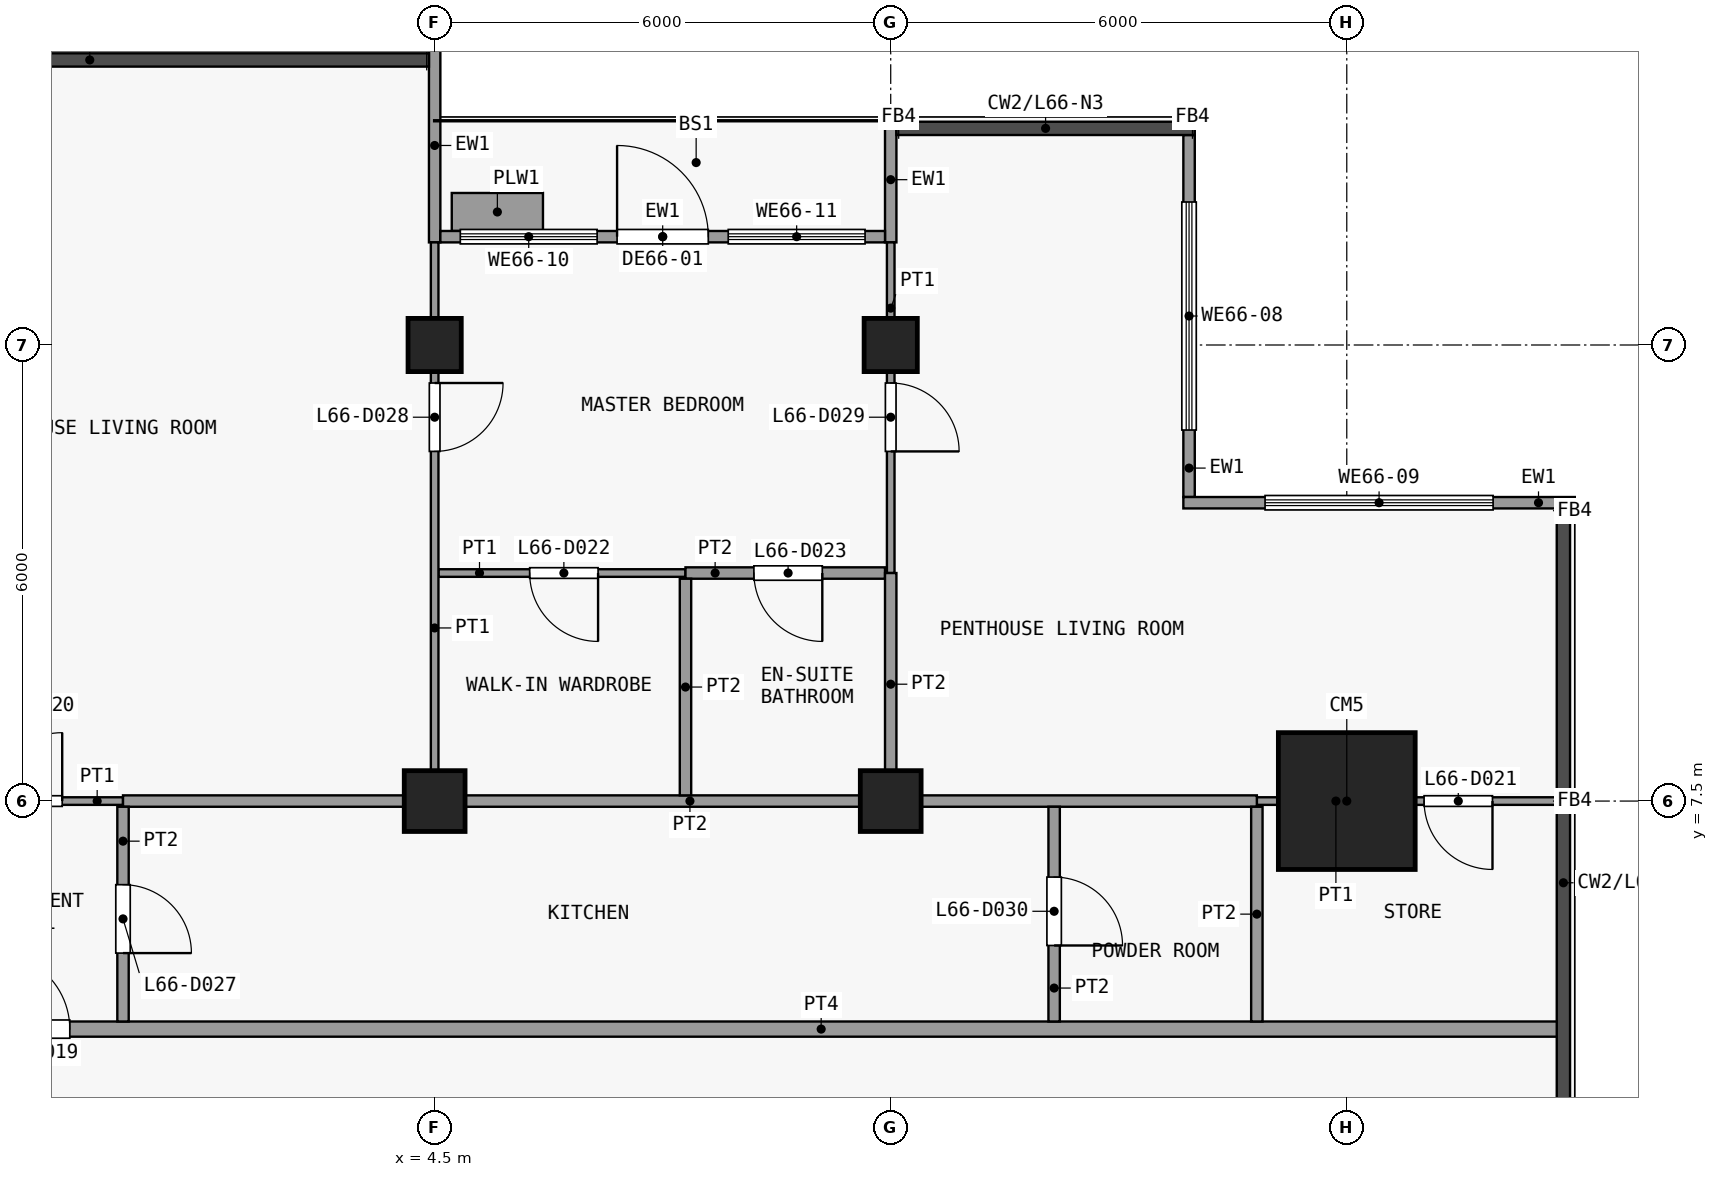
"""IFC4 building model, lengths in metres.
Left out: names, types, materials, properties, quantities, classifications, styles, units other than length and angle.
Written with IfcOpenShell. Run it as: python <this file> out.ifc"""

import sys

from ifc_helpers import new_model, si_unit, direction, frame, frame_2d, origin, origin_2d, place, context, subcontext, project, spatial, rectangle, extrude, element, fill, save


model = new_model("IFC4")
c1 = context("Model", 3, precision=1e-05, world=origin(), true_north=direction((0.0, 1.0)))
c2 = subcontext(c1, "Body", "Model", "MODEL_VIEW")
j1 = project(units=[si_unit("LENGTHUNIT", "METRE"), si_unit("PLANEANGLEUNIT", "RADIAN")], contexts=[c1])
p1 = place(None, origin())
s1 = spatial("IfcSite", under=j1, at=p1, CompositionType="ELEMENT")
p2 = place(p1, origin())
s2 = spatial("IfcBuilding", under=s1, at=p2, CompositionType="ELEMENT")
p3 = place(p2, frame((0.0, 0.0, 262.7)))
s3 = spatial("IfcBuildingStorey", under=s2, at=p3, CompositionType="ELEMENT", Elevation=262.7)
p4 = place(p3, frame((4.5, 7.5, 0.0), z_axis=(0.0, 0.0, 1.0), x_axis=(1.0, 0.0, 0.0)))
e1 = element("IfcColumn", 1, at=p4, inside=s3, PredefinedType="COLUMN", context=c2, shape_type="SweptSolid", body=[
    extrude(rectangle(XDim=0.8, YDim=0.8, at=origin_2d()), origin(), (0.0, 0.0, 1.0), 3.6),
])
p5 = place(p3, frame((4.5, 13.5, 0.0), z_axis=(0.0, 0.0, 1.0), x_axis=(1.0, 0.0, 0.0)))
e2 = element("IfcColumn", 2, at=p5, inside=s3, PredefinedType="COLUMN", context=c2, shape_type="SweptSolid", body=[
    extrude(rectangle(XDim=0.7, YDim=0.7, at=origin_2d()), origin(), (0.0, 0.0, 1.0), 3.6),
])
p6 = place(p3, frame((10.5, 7.5, 0.0), z_axis=(0.0, 0.0, 1.0), x_axis=(1.0, 0.0, 0.0)))
e3 = element("IfcColumn", 3, at=p6, inside=s3, PredefinedType="COLUMN", context=c2, shape_type="SweptSolid", body=[
    extrude(rectangle(XDim=0.8, YDim=0.8, at=origin_2d()), origin(), (0.0, 0.0, 1.0), 3.6),
])
p7 = place(p3, frame((10.5, 13.5, 0.0), z_axis=(0.0, 0.0, 1.0), x_axis=(1.0, 0.0, 0.0)))
e4 = element("IfcColumn", 4, at=p7, inside=s3, PredefinedType="COLUMN", context=c2, shape_type="SweptSolid", body=[
    extrude(rectangle(XDim=0.7, YDim=0.7, at=origin_2d()), origin(), (0.0, 0.0, 1.0), 3.6),
])
p8 = place(p3, frame((16.5, 7.5, 0.0), z_axis=(0.0, 0.0, 1.0), x_axis=(1.0, 0.0, 0.0)))
e5 = element("IfcColumn", 5, at=p8, inside=s3, PredefinedType="COLUMN", context=c2, shape_type="SweptSolid", body=[
    extrude(rectangle(XDim=1.8, YDim=1.8, at=origin_2d()), origin(), (0.0, 0.0, 1.0), 3.6),
])
p9 = place(p3, frame((14.425, 16.262, 0.0), z_axis=(0.0, 0.0, 1.0), x_axis=(0.0, -1.0, 0.0)))
e6 = element("IfcWall", 6, at=p9, inside=s3, PredefinedType="SOLIDWALL", context=c2, shape_type="SweptSolid", body=[
    extrude(rectangle(XDim=4.762, YDim=0.15, at=frame_2d((2.381, 0.0))), origin(), (0.0, 0.0, 1.0), 3.3),
])
p10 = place(p9, frame((0.881, 0.0, 0.9)))
e7 = element("IfcOpeningElement", 7, at=p10, cuts=e6, PredefinedType="OPENING", context=c2, shape_type="SweptSolid", body=[
    extrude(rectangle(XDim=3.0, YDim=2.4, at=frame_2d((1.5, 1.2))), frame((0.0, 0.085, 0.0), z_axis=(0.0, -1.0, 0.0), x_axis=(1.0, 0.0, 0.0)), (0.0, 0.0, 1.0), 0.17),
])
p11 = place(p3, frame((14.35, 11.425, 0.0), z_axis=(0.0, 0.0, 1.0), x_axis=(1.0, 0.0, 0.0)))
e8 = element("IfcWall", 8, at=p11, inside=s3, PredefinedType="SOLIDWALL", context=c2, shape_type="SweptSolid", body=[
    extrude(rectangle(XDim=5.15, YDim=0.15, at=frame_2d((2.575, 0.0))), origin(), (0.0, 0.0, 1.0), 3.3),
])
p12 = place(p11, frame((1.075, 0.0, 0.9)))
e9 = element("IfcOpeningElement", 9, at=p12, cuts=e8, PredefinedType="OPENING", context=c2, shape_type="SweptSolid", body=[
    extrude(rectangle(XDim=3.0, YDim=2.4, at=frame_2d((1.5, 1.2))), frame((0.0, 0.085, 0.0), z_axis=(0.0, -1.0, 0.0), x_axis=(1.0, 0.0, 0.0)), (0.0, 0.0, 1.0), 0.17),
])
p13 = place(p3, frame((4.5, 14.85, 0.0), z_axis=(0.0, 0.0, 1.0), x_axis=(0.0, 1.0, 0.0)))
e10 = element("IfcWall", 10, at=p13, inside=s3, PredefinedType="SOLIDWALL", context=c2, shape_type="SweptSolid", body=[
    extrude(rectangle(XDim=2.55, YDim=0.15, at=frame_2d((1.275, 0.0))), origin(), (0.0, 0.0, 1.0), 3.3),
])
p14 = place(p3, frame((10.5, 14.85, 0.0), z_axis=(0.0, 0.0, 1.0), x_axis=(0.0, 1.0, 0.0)))
e11 = element("IfcWall", 11, at=p14, inside=s3, PredefinedType="SOLIDWALL", context=c2, shape_type="SweptSolid", body=[
    extrude(rectangle(XDim=1.65, YDim=0.15, at=frame_2d((0.825, 0.0))), origin(), (0.0, 0.0, 1.0), 3.3),
])
p15 = place(p3, frame((4.575, 14.925, 0.0), z_axis=(0.0, 0.0, 1.0), x_axis=(1.0, 0.0, 0.0)))
e12 = element("IfcWall", 12, at=p15, inside=s3, PredefinedType="SOLIDWALL", context=c2, shape_type="SweptSolid", body=[
    extrude(rectangle(XDim=5.85, YDim=0.15, at=frame_2d((2.925, 0.0))), origin(), (0.0, 0.0, 1.0), 3.3),
])
p16 = place(p15, frame((2.325, 0.0, 0.0)))
e13 = element("IfcOpeningElement", 13, at=p16, cuts=e12, PredefinedType="OPENING", context=c2, shape_type="SweptSolid", body=[
    extrude(rectangle(XDim=1.2, YDim=2.4, at=frame_2d((0.6, 1.2))), frame((0.0, 0.085, 0.0), z_axis=(0.0, -1.0, 0.0), x_axis=(1.0, 0.0, 0.0)), (0.0, 0.0, 1.0), 0.17),
])
p17 = place(p15, frame((0.262, 0.0, 0.9)))
e14 = element("IfcOpeningElement", 14, at=p17, cuts=e12, PredefinedType="OPENING", context=c2, shape_type="SweptSolid", body=[
    extrude(rectangle(XDim=1.8, YDim=2.1, at=frame_2d((0.9, 1.05))), frame((0.0, 0.085, 0.0), z_axis=(0.0, -1.0, 0.0), x_axis=(1.0, 0.0, 0.0)), (0.0, 0.0, 1.0), 0.17),
])
p18 = place(p15, frame((3.788, 0.0, 0.9)))
e15 = element("IfcOpeningElement", 15, at=p18, cuts=e12, PredefinedType="OPENING", context=c2, shape_type="SweptSolid", body=[
    extrude(rectangle(XDim=1.8, YDim=2.1, at=frame_2d((0.9, 1.05))), frame((0.0, 0.085, 0.0), z_axis=(0.0, -1.0, 0.0), x_axis=(1.0, 0.0, 0.0)), (0.0, 0.0, 1.0), 0.17),
])
p19 = place(p3, frame((4.725, 15.25, 0.0), z_axis=(0.0, 0.0, 1.0), x_axis=(1.0, 0.0, 0.0)))
e16 = element("IfcWall", 16, at=p19, inside=s3, PredefinedType="USERDEFINED", context=c2, shape_type="SweptSolid", body=[
    extrude(rectangle(XDim=1.2, YDim=0.5, at=frame_2d((0.6, 0.0))), origin(), (0.0, 0.0, 1.0), 0.9),
])
p20 = place(p3, frame((-19.35, 4.5, 0.0), z_axis=(0.0, 0.0, 1.0), x_axis=(1.0, 0.0, 0.0)))
e17 = element("IfcWall", 17, at=p20, inside=s3, PredefinedType="PARTITIONING", context=c2, shape_type="SweptSolid", body=[
    extrude(rectangle(XDim=38.7, YDim=0.2, at=frame_2d((19.35, 0.0))), origin(), (0.0, 0.0, 1.0), 3.3),
])
p21 = place(p20, frame((1.0, 0.0, 0.0)))
e18 = element("IfcOpeningElement", 18, at=p21, cuts=e17, PredefinedType="OPENING", context=c2, shape_type="SweptSolid", body=[
    extrude(rectangle(XDim=0.9, YDim=2.1, at=frame_2d((0.45, 1.05))), frame((0.0, 0.11, 0.0), z_axis=(0.0, -1.0, 0.0), x_axis=(1.0, 0.0, 0.0)), (0.0, 0.0, 1.0), 0.22),
])
p22 = place(p20, frame((5.35, 0.0, 0.0)))
e19 = element("IfcOpeningElement", 19, at=p22, cuts=e17, PredefinedType="OPENING", context=c2, shape_type="SweptSolid", body=[
    extrude(rectangle(XDim=0.9, YDim=2.1, at=frame_2d((0.45, 1.05))), frame((0.0, 0.11, 0.0), z_axis=(0.0, -1.0, 0.0), x_axis=(1.0, 0.0, 0.0)), (0.0, 0.0, 1.0), 0.22),
])
p23 = place(p20, frame((11.35, 0.0, 0.0)))
e20 = element("IfcOpeningElement", 20, at=p23, cuts=e17, PredefinedType="OPENING", context=c2, shape_type="SweptSolid", body=[
    extrude(rectangle(XDim=0.9, YDim=2.1, at=frame_2d((0.45, 1.05))), frame((0.0, 0.11, 0.0), z_axis=(0.0, -1.0, 0.0), x_axis=(1.0, 0.0, 0.0)), (0.0, 0.0, 1.0), 0.22),
])
p24 = place(p20, frame((18.05, 0.0, 0.0)))
e21 = element("IfcOpeningElement", 21, at=p24, cuts=e17, PredefinedType="OPENING", context=c2, shape_type="SweptSolid", body=[
    extrude(rectangle(XDim=1.0, YDim=2.1, at=frame_2d((0.5, 1.05))), frame((0.0, 0.11, 0.0), z_axis=(0.0, -1.0, 0.0), x_axis=(1.0, 0.0, 0.0)), (0.0, 0.0, 1.0), 0.22),
])
p25 = place(p3, frame((-2.0, 7.5, 0.0), z_axis=(0.0, 0.0, 1.0), x_axis=(1.0, 0.0, 0.0)))
e22 = element("IfcWall", 22, at=p25, inside=s3, PredefinedType="PARTITIONING", context=c2, shape_type="SweptSolid", body=[
    extrude(rectangle(XDim=2.4, YDim=0.1, at=frame_2d((1.2, 0.0))), origin(), (0.0, 0.0, 1.0), 3.3),
])
p26 = place(p25, frame((0.7, 0.0, 0.0)))
e23 = element("IfcOpeningElement", 23, at=p26, cuts=e22, PredefinedType="OPENING", context=c2, shape_type="SweptSolid", body=[
    extrude(rectangle(XDim=0.9, YDim=2.1, at=frame_2d((0.45, 1.05))), frame((0.0, 0.06, 0.0), z_axis=(0.0, -1.0, 0.0), x_axis=(1.0, 0.0, 0.0)), (0.0, 0.0, 1.0), 0.12),
])
p27 = place(p3, frame((15.317, 7.5, 0.0), z_axis=(0.0, 0.0, 1.0), x_axis=(1.0, 0.0, 0.0)))
e24 = element("IfcWall", 24, at=p27, inside=s3, PredefinedType="PARTITIONING", context=c2, shape_type="SweptSolid", body=[
    extrude(rectangle(XDim=3.946, YDim=0.1, at=frame_2d((1.973, 0.0))), origin(), (0.0, 0.0, 1.0), 3.3),
])
p28 = place(p27, frame((2.2, 0.0, 0.0)))
e25 = element("IfcOpeningElement", 25, at=p28, cuts=e24, PredefinedType="OPENING", context=c2, shape_type="SweptSolid", body=[
    extrude(rectangle(XDim=0.9, YDim=2.1, at=frame_2d((0.45, 1.05))), frame((0.0, 0.06, 0.0), z_axis=(0.0, -1.0, 0.0), x_axis=(1.0, 0.0, 0.0)), (0.0, 0.0, 1.0), 0.12),
])
p29 = place(p3, frame((0.4, 7.5, 0.0), z_axis=(0.0, 0.0, 1.0), x_axis=(1.0, 0.0, 0.0)))
e26 = element("IfcWall", 26, at=p29, inside=s3, PredefinedType="PARTITIONING", context=c2, shape_type="SweptSolid", body=[
    extrude(rectangle(XDim=14.917, YDim=0.15, at=frame_2d((7.458, 0.0))), origin(), (0.0, 0.0, 1.0), 3.3),
])
p30 = place(p3, frame((4.55, 10.5, 0.0), z_axis=(0.0, 0.0, 1.0), x_axis=(1.0, 0.0, 0.0)))
e27 = element("IfcWall", 27, at=p30, inside=s3, PredefinedType="PARTITIONING", context=c2, shape_type="SweptSolid", body=[
    extrude(rectangle(XDim=3.25, YDim=0.1, at=frame_2d((1.625, 0.0))), origin(), (0.0, 0.0, 1.0), 3.3),
])
p31 = place(p30, frame((1.2, 0.0, 0.0)))
e28 = element("IfcOpeningElement", 28, at=p31, cuts=e27, PredefinedType="OPENING", context=c2, shape_type="SweptSolid", body=[
    extrude(rectangle(XDim=0.9, YDim=2.1, at=frame_2d((0.45, 1.05))), frame((0.0, 0.06, 0.0), z_axis=(0.0, -1.0, 0.0), x_axis=(1.0, 0.0, 0.0)), (0.0, 0.0, 1.0), 0.12),
])
p32 = place(p3, frame((7.8, 10.5, 0.0), z_axis=(0.0, 0.0, 1.0), x_axis=(1.0, 0.0, 0.0)))
e29 = element("IfcWall", 29, at=p32, inside=s3, PredefinedType="PARTITIONING", context=c2, shape_type="SweptSolid", body=[
    extrude(rectangle(XDim=2.625, YDim=0.15, at=frame_2d((1.312, 0.0))), origin(), (0.0, 0.0, 1.0), 3.3),
])
p33 = place(p32, frame((0.9, 0.0, 0.0)))
e30 = element("IfcOpeningElement", 30, at=p33, cuts=e29, PredefinedType="OPENING", context=c2, shape_type="SweptSolid", body=[
    extrude(rectangle(XDim=0.9, YDim=2.1, at=frame_2d((0.45, 1.05))), frame((0.0, 0.085, 0.0), z_axis=(0.0, -1.0, 0.0), x_axis=(1.0, 0.0, 0.0)), (0.0, 0.0, 1.0), 0.17),
])
p34 = place(p3, frame((0.4, 4.6, 0.0), z_axis=(0.0, 0.0, 1.0), x_axis=(0.0, 1.0, 0.0)))
e31 = element("IfcWall", 31, at=p34, inside=s3, PredefinedType="PARTITIONING", context=c2, shape_type="SweptSolid", body=[
    extrude(rectangle(XDim=2.825, YDim=0.15, at=frame_2d((1.413, 0.0))), origin(), (0.0, 0.0, 1.0), 3.3),
])
p35 = place(p34, frame((0.9, 0.0, 0.0)))
e32 = element("IfcOpeningElement", 32, at=p35, cuts=e31, PredefinedType="OPENING", context=c2, shape_type="SweptSolid", body=[
    extrude(rectangle(XDim=0.9, YDim=2.1, at=frame_2d((0.45, 1.05))), frame((0.0, 0.085, 0.0), z_axis=(0.0, -1.0, 0.0), x_axis=(1.0, 0.0, 0.0)), (0.0, 0.0, 1.0), 0.17),
])
p36 = place(p3, frame((4.5, 7.575, 0.0), z_axis=(0.0, 0.0, 1.0), x_axis=(0.0, 1.0, 0.0)))
e33 = element("IfcWall", 33, at=p36, inside=s3, PredefinedType="PARTITIONING", context=c2, shape_type="SweptSolid", body=[
    extrude(rectangle(XDim=7.275, YDim=0.1, at=frame_2d((3.638, 0.0))), origin(), (0.0, 0.0, 1.0), 3.3),
])
p37 = place(p36, frame((4.525, 0.0, 0.0)))
e34 = element("IfcOpeningElement", 34, at=p37, cuts=e33, PredefinedType="OPENING", context=c2, shape_type="SweptSolid", body=[
    extrude(rectangle(XDim=0.9, YDim=2.1, at=frame_2d((0.45, 1.05))), frame((0.0, 0.06, 0.0), z_axis=(0.0, -1.0, 0.0), x_axis=(1.0, 0.0, 0.0)), (0.0, 0.0, 1.0), 0.12),
])
p38 = place(p3, frame((7.8, 7.575, 0.0), z_axis=(0.0, 0.0, 1.0), x_axis=(0.0, 1.0, 0.0)))
e35 = element("IfcWall", 35, at=p38, inside=s3, PredefinedType="PARTITIONING", context=c2, shape_type="SweptSolid", body=[
    extrude(rectangle(XDim=2.85, YDim=0.15, at=frame_2d((1.425, 0.0))), origin(), (0.0, 0.0, 1.0), 3.3),
])
p39 = place(p3, frame((10.5, 10.5, 0.0), z_axis=(0.0, 0.0, 1.0), x_axis=(0.0, 1.0, 0.0)))
e36 = element("IfcWall", 36, at=p39, inside=s3, PredefinedType="PARTITIONING", context=c2, shape_type="SweptSolid", body=[
    extrude(rectangle(XDim=4.35, YDim=0.1, at=frame_2d((2.175, 0.0))), origin(), (0.0, 0.0, 1.0), 3.3),
])
p40 = place(p39, frame((1.6, 0.0, 0.0)))
e37 = element("IfcOpeningElement", 37, at=p40, cuts=e36, PredefinedType="OPENING", context=c2, shape_type="SweptSolid", body=[
    extrude(rectangle(XDim=0.9, YDim=2.1, at=frame_2d((0.45, 1.05))), frame((0.0, 0.06, 0.0), z_axis=(0.0, -1.0, 0.0), x_axis=(1.0, 0.0, 0.0)), (0.0, 0.0, 1.0), 0.12),
])
p41 = place(p3, frame((10.5, 7.575, 0.0), z_axis=(0.0, 0.0, 1.0), x_axis=(0.0, 1.0, 0.0)))
e38 = element("IfcWall", 38, at=p41, inside=s3, PredefinedType="PARTITIONING", context=c2, shape_type="SweptSolid", body=[
    extrude(rectangle(XDim=2.925, YDim=0.15, at=frame_2d((1.462, 0.0))), origin(), (0.0, 0.0, 1.0), 3.3),
])
p42 = place(p3, frame((12.65, 4.6, 0.0), z_axis=(0.0, 0.0, 1.0), x_axis=(0.0, 1.0, 0.0)))
e39 = element("IfcWall", 39, at=p42, inside=s3, PredefinedType="PARTITIONING", context=c2, shape_type="SweptSolid", body=[
    extrude(rectangle(XDim=2.825, YDim=0.15, at=frame_2d((1.413, 0.0))), origin(), (0.0, 0.0, 1.0), 3.3),
])
p43 = place(p42, frame((1.0, 0.0, 0.0)))
e40 = element("IfcOpeningElement", 40, at=p43, cuts=e39, PredefinedType="OPENING", context=c2, shape_type="SweptSolid", body=[
    extrude(rectangle(XDim=0.9, YDim=2.1, at=frame_2d((0.45, 1.05))), frame((0.0, 0.085, 0.0), z_axis=(0.0, -1.0, 0.0), x_axis=(1.0, 0.0, 0.0)), (0.0, 0.0, 1.0), 0.17),
])
p44 = place(p3, frame((15.317, 4.6, 0.0), z_axis=(0.0, 0.0, 1.0), x_axis=(0.0, 1.0, 0.0)))
e41 = element("IfcWall", 41, at=p44, inside=s3, PredefinedType="PARTITIONING", context=c2, shape_type="SweptSolid", body=[
    extrude(rectangle(XDim=2.825, YDim=0.15, at=frame_2d((1.413, 0.0))), origin(), (0.0, 0.0, 1.0), 3.3),
])
p45 = place(p10, origin())
e42 = element("IfcWindow", 42, at=p45, inside=s3, PartitioningType="SINGLE_PANEL", PredefinedType="WINDOW", context=c2, shape_type="SweptSolid", body=[
    extrude(rectangle(XDim=3.0, YDim=2.4, at=frame_2d((1.5, 1.2))), frame((0.0, 0.03, 0.0), z_axis=(0.0, -1.0, 0.0), x_axis=(1.0, 0.0, 0.0)), (0.0, 0.0, 1.0), 0.06),
])
fill(e7, e42)
p46 = place(p12, origin())
e43 = element("IfcWindow", 43, at=p46, inside=s3, PartitioningType="SINGLE_PANEL", PredefinedType="WINDOW", context=c2, shape_type="SweptSolid", body=[
    extrude(rectangle(XDim=3.0, YDim=2.4, at=frame_2d((1.5, 1.2))), frame((0.0, 0.03, 0.0), z_axis=(0.0, -1.0, 0.0), x_axis=(1.0, 0.0, 0.0)), (0.0, 0.0, 1.0), 0.06),
])
fill(e9, e43)
p47 = place(p16, origin())
e44 = element("IfcDoor", 44, at=p47, inside=s3, OperationType="SINGLE_SWING_LEFT", PredefinedType="DOOR", context=c2, shape_type="SweptSolid", body=[
    extrude(rectangle(XDim=1.2, YDim=2.4, at=frame_2d((0.6, 1.2))), frame((0.0, 0.025, 0.0), z_axis=(0.0, -1.0, 0.0), x_axis=(1.0, 0.0, 0.0)), (0.0, 0.0, 1.0), 0.05),
])
fill(e13, e44)
p48 = place(p17, origin())
e45 = element("IfcWindow", 45, at=p48, inside=s3, PartitioningType="SINGLE_PANEL", PredefinedType="WINDOW", context=c2, shape_type="SweptSolid", body=[
    extrude(rectangle(XDim=1.8, YDim=2.1, at=frame_2d((0.9, 1.05))), frame((0.0, 0.03, 0.0), z_axis=(0.0, -1.0, 0.0), x_axis=(1.0, 0.0, 0.0)), (0.0, 0.0, 1.0), 0.06),
])
fill(e14, e45)
p49 = place(p18, origin())
e46 = element("IfcWindow", 46, at=p49, inside=s3, PartitioningType="SINGLE_PANEL", PredefinedType="WINDOW", context=c2, shape_type="SweptSolid", body=[
    extrude(rectangle(XDim=1.8, YDim=2.1, at=frame_2d((0.9, 1.05))), frame((0.0, 0.03, 0.0), z_axis=(0.0, -1.0, 0.0), x_axis=(1.0, 0.0, 0.0)), (0.0, 0.0, 1.0), 0.06),
])
fill(e15, e46)
p50 = place(p24, origin())
e47 = element("IfcDoor", 47, at=p50, inside=s3, OperationType="SINGLE_SWING_RIGHT", PredefinedType="DOOR", context=c2, shape_type="SweptSolid", body=[
    extrude(rectangle(XDim=1.0, YDim=2.1, at=frame_2d((0.5, 1.05))), frame((0.0, 0.025, 0.0), z_axis=(0.0, -1.0, 0.0), x_axis=(1.0, 0.0, 0.0)), (0.0, 0.0, 1.0), 0.05),
])
fill(e21, e47)
p51 = place(p26, origin())
e48 = element("IfcDoor", 48, at=p51, inside=s3, OperationType="SINGLE_SWING_LEFT", PredefinedType="DOOR", context=c2, shape_type="SweptSolid", body=[
    extrude(rectangle(XDim=0.9, YDim=2.1, at=frame_2d((0.45, 1.05))), frame((0.0, 0.025, 0.0), z_axis=(0.0, -1.0, 0.0), x_axis=(1.0, 0.0, 0.0)), (0.0, 0.0, 1.0), 0.05),
])
fill(e23, e48)
p52 = place(p28, origin())
e49 = element("IfcDoor", 49, at=p52, inside=s3, OperationType="SINGLE_SWING_RIGHT", PredefinedType="DOOR", context=c2, shape_type="SweptSolid", body=[
    extrude(rectangle(XDim=0.9, YDim=2.1, at=frame_2d((0.45, 1.05))), frame((0.0, 0.025, 0.0), z_axis=(0.0, -1.0, 0.0), x_axis=(1.0, 0.0, 0.0)), (0.0, 0.0, 1.0), 0.05),
])
fill(e25, e49)
p53 = place(p31, origin())
e50 = element("IfcDoor", 50, at=p53, inside=s3, OperationType="SINGLE_SWING_RIGHT", PredefinedType="DOOR", context=c2, shape_type="SweptSolid", body=[
    extrude(rectangle(XDim=0.9, YDim=2.1, at=frame_2d((0.45, 1.05))), frame((0.0, 0.025, 0.0), z_axis=(0.0, -1.0, 0.0), x_axis=(1.0, 0.0, 0.0)), (0.0, 0.0, 1.0), 0.05),
])
fill(e28, e50)
p54 = place(p33, origin())
e51 = element("IfcDoor", 51, at=p54, inside=s3, OperationType="SINGLE_SWING_RIGHT", PredefinedType="DOOR", context=c2, shape_type="SweptSolid", body=[
    extrude(rectangle(XDim=0.9, YDim=2.1, at=frame_2d((0.45, 1.05))), frame((0.0, 0.025, 0.0), z_axis=(0.0, -1.0, 0.0), x_axis=(1.0, 0.0, 0.0)), (0.0, 0.0, 1.0), 0.05),
])
fill(e30, e51)
p55 = place(p35, origin())
e52 = element("IfcDoor", 52, at=p55, inside=s3, OperationType="SINGLE_SWING_LEFT", PredefinedType="DOOR", context=c2, shape_type="SweptSolid", body=[
    extrude(rectangle(XDim=0.9, YDim=2.1, at=frame_2d((0.45, 1.05))), frame((0.0, 0.025, 0.0), z_axis=(0.0, -1.0, 0.0), x_axis=(1.0, 0.0, 0.0)), (0.0, 0.0, 1.0), 0.05),
])
fill(e32, e52)
p56 = place(p37, origin())
e53 = element("IfcDoor", 53, at=p56, inside=s3, OperationType="SINGLE_SWING_RIGHT", PredefinedType="DOOR", context=c2, shape_type="SweptSolid", body=[
    extrude(rectangle(XDim=0.9, YDim=2.1, at=frame_2d((0.45, 1.05))), frame((0.0, 0.025, 0.0), z_axis=(0.0, -1.0, 0.0), x_axis=(1.0, 0.0, 0.0)), (0.0, 0.0, 1.0), 0.05),
])
fill(e34, e53)
p57 = place(p40, origin())
e54 = element("IfcDoor", 54, at=p57, inside=s3, OperationType="SINGLE_SWING_LEFT", PredefinedType="DOOR", context=c2, shape_type="SweptSolid", body=[
    extrude(rectangle(XDim=0.9, YDim=2.1, at=frame_2d((0.45, 1.05))), frame((0.0, 0.025, 0.0), z_axis=(0.0, -1.0, 0.0), x_axis=(1.0, 0.0, 0.0)), (0.0, 0.0, 1.0), 0.05),
])
fill(e37, e54)
p58 = place(p43, origin())
e55 = element("IfcDoor", 55, at=p58, inside=s3, OperationType="SINGLE_SWING_LEFT", PredefinedType="DOOR", context=c2, shape_type="SweptSolid", body=[
    extrude(rectangle(XDim=0.9, YDim=2.1, at=frame_2d((0.45, 1.05))), frame((0.0, 0.025, 0.0), z_axis=(0.0, -1.0, 0.0), x_axis=(1.0, 0.0, 0.0)), (0.0, 0.0, 1.0), 0.05),
])
fill(e40, e55)
save(model, sys.argv[1])
